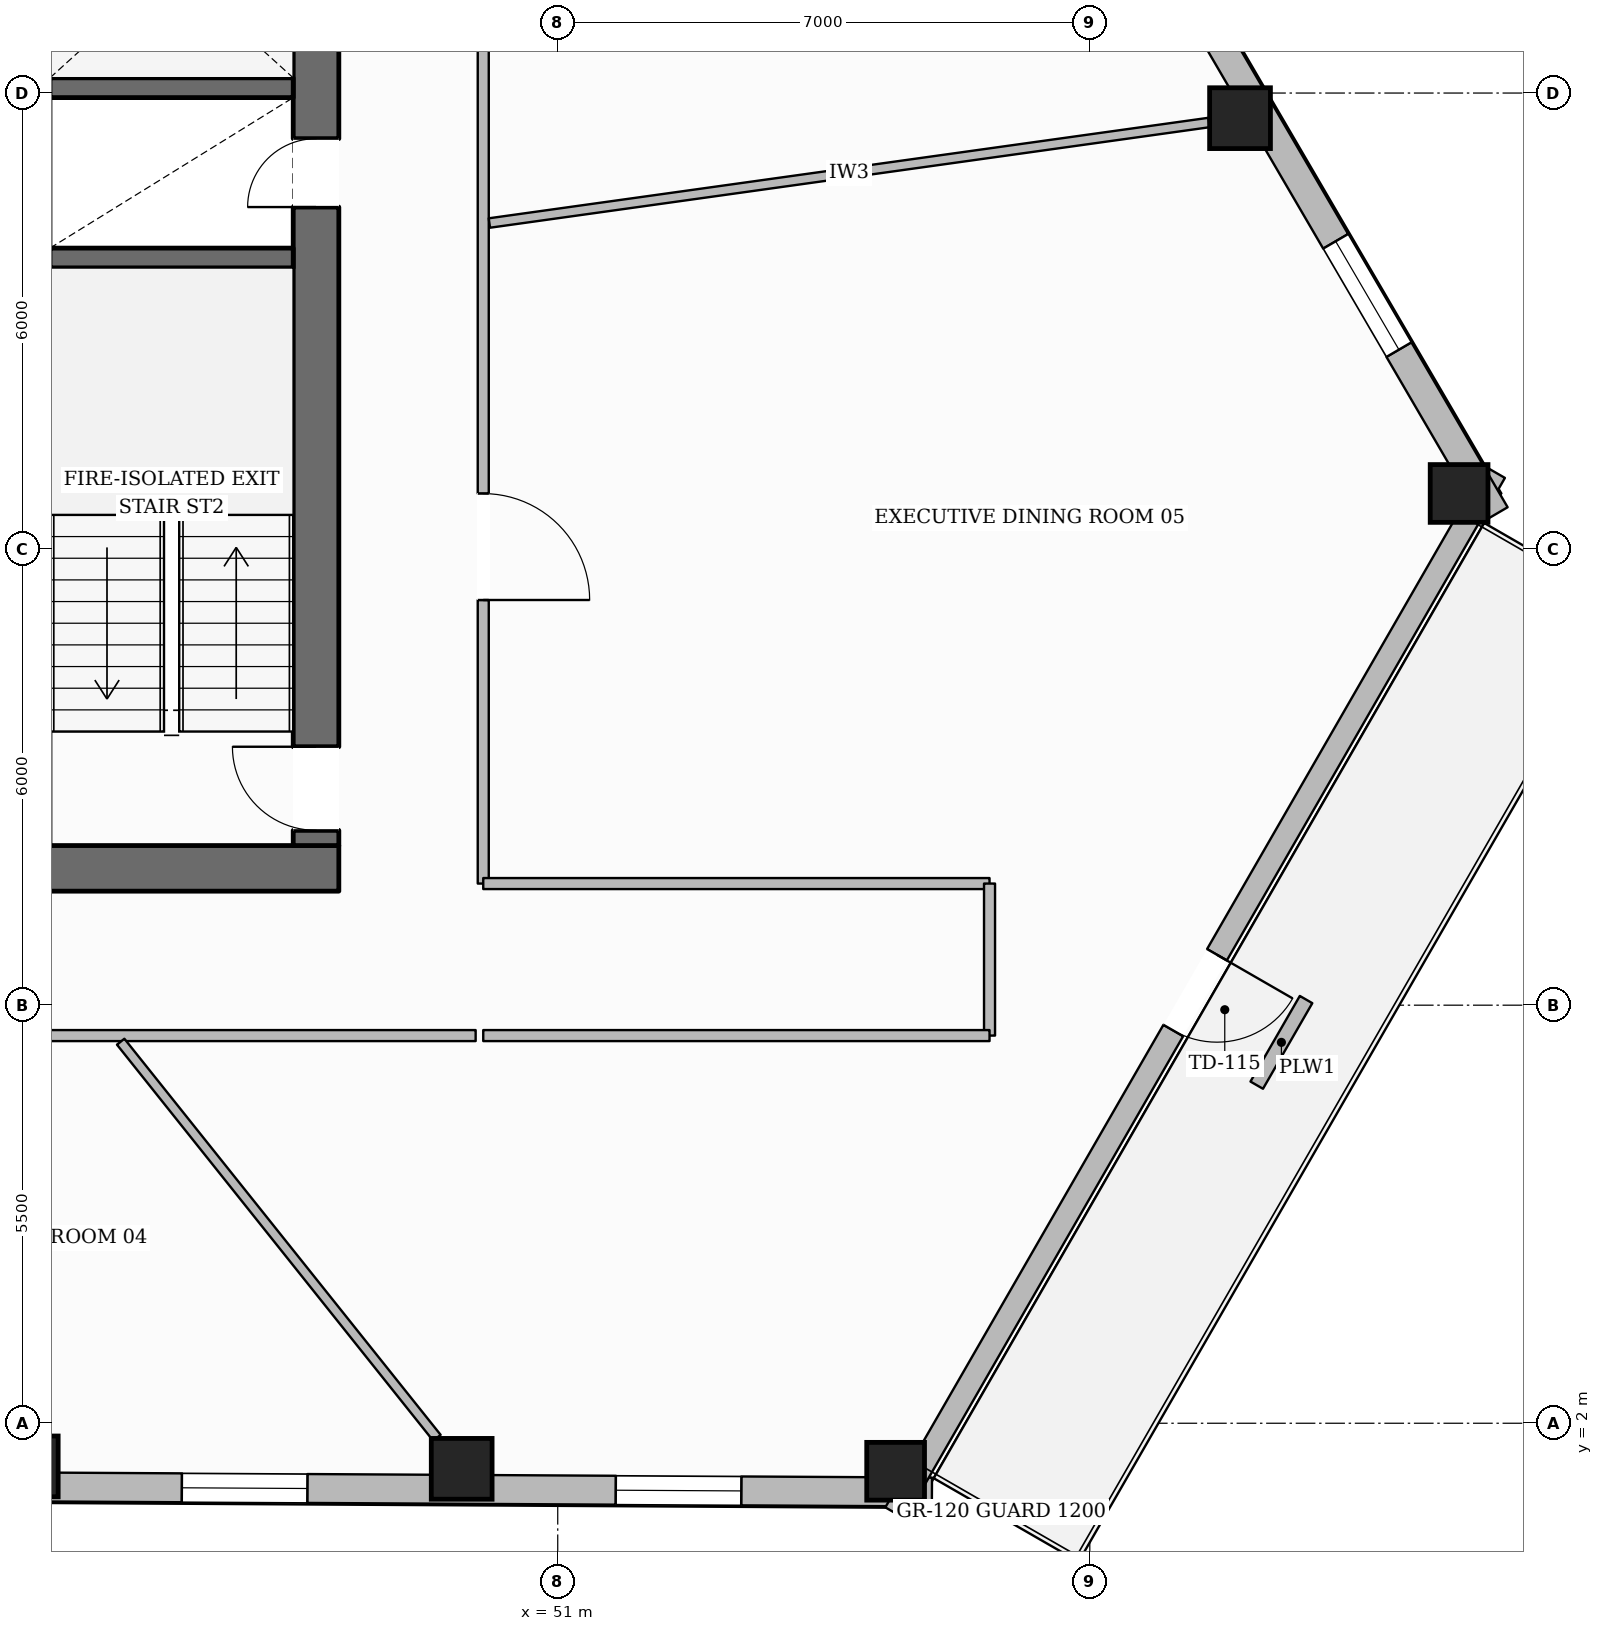
"""IFC4 building model, lengths in metres.
Left out: names, types, materials, properties, quantities, classifications, styles, units other than length and angle.
Written with IfcOpenShell. Run it as: python <this file> out.ifc"""

import sys

from ifc_helpers import new_model, si_unit, direction, frame, frame_2d, origin, origin_2d, place, context, subcontext, project, spatial, rectangle, hollow_rectangle, extrude, element, fill, save


model = new_model("IFC4")
c1 = context("Model", 3, precision=1e-05, world=origin(), true_north=direction((0.0, 1.0)))
c2 = subcontext(c1, "Body", "Model", "MODEL_VIEW")
j1 = project(units=[si_unit("LENGTHUNIT", "METRE"), si_unit("PLANEANGLEUNIT", "RADIAN")], contexts=[c1])
p1 = place(None, origin())
s1 = spatial("IfcSite", under=j1, at=p1, CompositionType="ELEMENT")
p2 = place(p1, origin())
s2 = spatial("IfcBuilding", under=s1, at=p2, CompositionType="ELEMENT")
p3 = place(p2, frame((0.0, 0.0, 48.35)))
s3 = spatial("IfcBuildingStorey", under=s2, at=p3, CompositionType="ELEMENT", Elevation=48.35)
p4 = place(p3, frame((27.88, 9.3, 0.0), z_axis=(0.0, 0.0, 1.0), x_axis=(1.0, 0.0, 0.0)))
e1 = element("IfcWall", 1, at=p4, inside=s3, PredefinedType="SOLIDWALL", context=c2, shape_type="SweptSolid", body=[
    extrude(rectangle(XDim=20.24, YDim=0.6, at=frame_2d((10.12, 0.0))), origin(), (0.0, 0.0, 1.0), 3.59),
])
p5 = place(p4, frame((10.62, 0.0, 0.0)))
e2 = element("IfcOpeningElement", 2, at=p5, cuts=e1, PredefinedType="OPENING", context=c2, shape_type="SweptSolid", body=[
    extrude(rectangle(XDim=1.4, YDim=2.2, at=frame_2d((0.7, 1.1))), frame((0.0, 0.31, 0.0), z_axis=(0.0, -1.0, 0.0), x_axis=(1.0, 0.0, 0.0)), (0.0, 0.0, 1.0), 0.62),
])
p6 = place(p3, frame((47.82, 9.6, 0.0), z_axis=(0.0, 0.0, 1.0), x_axis=(0.0, 1.0, 0.0)))
e3 = element("IfcWall", 3, at=p6, inside=s3, PredefinedType="SOLIDWALL", context=c2, shape_type="SweptSolid", body=[
    extrude(rectangle(XDim=13.0, YDim=0.6, at=frame_2d((6.5, 0.0))), origin(), (0.0, 0.0, 1.0), 3.59),
])
p7 = place(p6, frame((0.2, 0.0, 0.0)))
e4 = element("IfcOpeningElement", 4, at=p7, cuts=e3, PredefinedType="OPENING", context=c2, shape_type="SweptSolid", body=[
    extrude(rectangle(XDim=1.1, YDim=2.15, at=frame_2d((0.55, 1.075))), frame((0.0, 0.31, 0.0), z_axis=(0.0, -1.0, 0.0), x_axis=(1.0, 0.0, 0.0)), (0.0, 0.0, 1.0), 0.62),
])
p8 = place(p6, frame((8.4, 0.0, 0.0)))
e5 = element("IfcOpeningElement", 5, at=p8, cuts=e3, PredefinedType="OPENING", context=c2, shape_type="SweptSolid", body=[
    extrude(rectangle(XDim=0.9, YDim=2.1, at=frame_2d((0.45, 1.05))), frame((0.0, 0.31, 0.0), z_axis=(0.0, -1.0, 0.0), x_axis=(1.0, 0.0, 0.0)), (0.0, 0.0, 1.0), 0.62),
])
for number, where, z_axis, x_axis in (
    (6, (44.32, 17.33, 0.0), (0.0, 0.0, 1.0), (1.0, 0.0, 0.0)),
    (7, (44.32, 19.57, 0.0), (0.0, 0.0, 1.0), (1.0, 0.0, 0.0)),
):
    element("IfcWall", number, at=place(p3, frame(where, z_axis=z_axis, x_axis=x_axis)), inside=s3, PredefinedType="SHEAR", context=c2, shape_type="SweptSolid", body=[
        extrude(rectangle(XDim=3.2, YDim=0.26, at=frame_2d((1.6, 0.0))), origin(), (0.0, 0.0, 1.0), 3.59),
    ])
for number, where, z_axis, x_axis in (
    (8, (44.027, 1.432, 0.0), (0.0, 0.0, 1.0), (1.0, 0.0, 0.0)),
    (9, (49.736, 1.4, 0.0), (0.0, 0.0, 1.0), (1.0, 0.0, 0.0)),
):
    element("IfcColumn", number, at=place(p3, frame(where, z_axis=z_axis, x_axis=x_axis)), inside=s3, PredefinedType="COLUMN", context=c2, shape_type="SweptSolid", body=[
        extrude(hollow_rectangle(XDim=0.8, YDim=0.8, WallThickness=0.036, at=origin_2d()), origin(), (0.0, 0.0, 1.0), 3.59),
    ])
for number, where, z_axis, x_axis in (
    (10, (55.445, 1.368, 0.0), (0.0, 0.0, 1.0), (1.0, 0.0, 0.0)),
    (11, (62.858, 14.232, 0.0), (0.0, 0.0, 1.0), (1.0, 0.0, 0.0)),
):
    element("IfcColumn", number, at=place(p3, frame(where, z_axis=z_axis, x_axis=x_axis)), inside=s3, PredefinedType="COLUMN", context=c2, shape_type="SweptSolid", body=[
        extrude(hollow_rectangle(XDim=0.76, YDim=0.76, WallThickness=0.035, at=origin_2d()), origin(), (0.0, 0.0, 1.0), 3.59),
    ])
p9 = place(p3, frame((59.976, 19.169, 0.0), z_axis=(0.0, 0.0, 1.0), x_axis=(1.0, 0.0, 0.0)))
e12 = element("IfcColumn", 12, at=p9, inside=s3, PredefinedType="COLUMN", context=c2, shape_type="SweptSolid", body=[
    extrude(hollow_rectangle(XDim=0.8, YDim=0.8, WallThickness=0.036, at=origin_2d()), origin(), (0.0, 0.0, 1.0), 3.59),
])
p10 = place(p3, frame((55.923, 1.096, 0.0), z_axis=(0.0, 0.0, 1.0), x_axis=(-0.999984419156, 0.005582243732, 0.0)))
e13 = element("IfcWall", 13, at=p10, inside=s3, PredefinedType="STANDARD", context=c2, shape_type="SweptSolid", body=[
    extrude(rectangle(XDim=35.207, YDim=0.38, at=frame_2d((17.604, 0.0))), origin(), (0.0, 0.0, 1.0), 2.97),
])
p11 = place(p10, frame((25.805, 0.0, 0.0)))
e14 = element("IfcOpeningElement", 14, at=p11, cuts=e13, PredefinedType="OPENING", context=c2, shape_type="SweptSolid", body=[
    extrude(rectangle(XDim=1.0, YDim=2.2, at=frame_2d((0.5, 1.1))), frame((0.0, 0.2, 0.0), z_axis=(0.0, -1.0, 0.0), x_axis=(1.0, 0.0, 0.0)), (0.0, 0.0, 1.0), 0.4),
])
p12 = place(p10, frame((31.054, 0.0, 0.65)))
e15 = element("IfcOpeningElement", 15, at=p12, cuts=e13, PredefinedType="OPENING", context=c2, shape_type="SweptSolid", body=[
    extrude(rectangle(XDim=1.65, YDim=1.75, at=frame_2d((0.825, 0.875))), frame((0.0, 0.2, 0.0), z_axis=(0.0, -1.0, 0.0), x_axis=(1.0, 0.0, 0.0)), (0.0, 0.0, 1.0), 0.4),
])
p13 = place(p10, frame((19.636, 0.0, 0.65)))
e16 = element("IfcOpeningElement", 16, at=p13, cuts=e13, PredefinedType="OPENING", context=c2, shape_type="SweptSolid", body=[
    extrude(rectangle(XDim=1.65, YDim=1.75, at=frame_2d((0.825, 0.875))), frame((0.0, 0.2, 0.0), z_axis=(0.0, -1.0, 0.0), x_axis=(1.0, 0.0, 0.0)), (0.0, 0.0, 1.0), 0.4),
])
p14 = place(p10, frame((8.218, 0.0, 0.65)))
e17 = element("IfcOpeningElement", 17, at=p14, cuts=e13, PredefinedType="OPENING", context=c2, shape_type="SweptSolid", body=[
    extrude(rectangle(XDim=1.65, YDim=1.75, at=frame_2d((0.825, 0.875))), frame((0.0, 0.2, 0.0), z_axis=(0.0, -1.0, 0.0), x_axis=(1.0, 0.0, 0.0)), (0.0, 0.0, 1.0), 0.4),
])
p15 = place(p10, frame((2.509, 0.0, 0.65)))
e18 = element("IfcOpeningElement", 18, at=p15, cuts=e13, PredefinedType="OPENING", context=c2, shape_type="SweptSolid", body=[
    extrude(rectangle(XDim=1.65, YDim=1.75, at=frame_2d((0.825, 0.875))), frame((0.0, 0.2, 0.0), z_axis=(0.0, -1.0, 0.0), x_axis=(1.0, 0.0, 0.0)), (0.0, 0.0, 1.0), 0.4),
])
p16 = place(p3, frame((63.331, 14.512, 0.0), z_axis=(0.0, 0.0, 1.0), x_axis=(-0.499311399625, -0.866422602547, 0.0)))
e19 = element("IfcWall", 19, at=p16, inside=s3, PredefinedType="STANDARD", context=c2, shape_type="SweptSolid", body=[
    extrude(rectangle(XDim=15.804, YDim=0.3, at=frame_2d((7.902, 0.0))), origin(), (0.0, 0.0, 1.0), 2.97),
])
p17 = place(p16, frame((7.327, 0.0, 0.0)))
e20 = element("IfcOpeningElement", 20, at=p17, cuts=e19, PredefinedType="OPENING", context=c2, shape_type="SweptSolid", body=[
    extrude(rectangle(XDim=1.15, YDim=2.2, at=frame_2d((0.575, 1.1))), frame((0.0, 0.16, 0.0), z_axis=(0.0, -1.0, 0.0), x_axis=(1.0, 0.0, 0.0)), (0.0, 0.0, 1.0), 0.32),
])
p18 = place(p3, frame((45.56, 44.402, 0.0), z_axis=(0.0, 0.0, 1.0), x_axis=(0.504140111044, -0.86362187816, 0.0)))
e21 = element("IfcWall", 21, at=p18, inside=s3, PredefinedType="STANDARD", context=c2, shape_type="SweptSolid", body=[
    extrude(rectangle(XDim=35.254, YDim=0.38, at=frame_2d((17.627, 0.0))), origin(), (0.0, 0.0, 1.0), 2.97),
])
p19 = place(p18, frame((31.093, 0.0, 0.65)))
e22 = element("IfcOpeningElement", 22, at=p19, cuts=e21, PredefinedType="OPENING", context=c2, shape_type="SweptSolid", body=[
    extrude(rectangle(XDim=1.65, YDim=1.75, at=frame_2d((0.825, 0.875))), frame((0.0, 0.2, 0.0), z_axis=(0.0, -1.0, 0.0), x_axis=(1.0, 0.0, 0.0)), (0.0, 0.0, 1.0), 0.4),
])
p20 = place(p18, frame((25.375, 0.0, 0.65)))
e23 = element("IfcOpeningElement", 23, at=p20, cuts=e21, PredefinedType="OPENING", context=c2, shape_type="SweptSolid", body=[
    extrude(rectangle(XDim=1.65, YDim=1.75, at=frame_2d((0.825, 0.875))), frame((0.0, 0.2, 0.0), z_axis=(0.0, -1.0, 0.0), x_axis=(1.0, 0.0, 0.0)), (0.0, 0.0, 1.0), 0.4),
])
p21 = place(p18, frame((19.658, 0.0, 0.65)))
e24 = element("IfcOpeningElement", 24, at=p21, cuts=e21, PredefinedType="OPENING", context=c2, shape_type="SweptSolid", body=[
    extrude(rectangle(XDim=1.65, YDim=1.75, at=frame_2d((0.825, 0.875))), frame((0.0, 0.2, 0.0), z_axis=(0.0, -1.0, 0.0), x_axis=(1.0, 0.0, 0.0)), (0.0, 0.0, 1.0), 0.4),
])
p22 = place(p18, frame((8.224, 0.0, 0.65)))
e25 = element("IfcOpeningElement", 25, at=p22, cuts=e21, PredefinedType="OPENING", context=c2, shape_type="SweptSolid", body=[
    extrude(rectangle(XDim=1.65, YDim=1.75, at=frame_2d((0.825, 0.875))), frame((0.0, 0.2, 0.0), z_axis=(0.0, -1.0, 0.0), x_axis=(1.0, 0.0, 0.0)), (0.0, 0.0, 1.0), 0.4),
])
p23 = place(p18, frame((2.507, 0.0, 0.65)))
e26 = element("IfcOpeningElement", 26, at=p23, cuts=e21, PredefinedType="OPENING", context=c2, shape_type="SweptSolid", body=[
    extrude(rectangle(XDim=1.65, YDim=1.75, at=frame_2d((0.825, 0.875))), frame((0.0, 0.2, 0.0), z_axis=(0.0, -1.0, 0.0), x_axis=(1.0, 0.0, 0.0)), (0.0, 0.0, 1.0), 0.4),
])
p24 = place(p3, frame((60.196, 6.448, 0.0), z_axis=(0.0, 0.0, 1.0), x_axis=(0.49931057024, 0.866423080514, 0.0)))
e27 = element("IfcWall", 27, at=p24, inside=s3, PredefinedType="USERDEFINED", context=c2, shape_type="SweptSolid", body=[
    extrude(rectangle(XDim=1.3, YDim=0.19, at=frame_2d((0.65, 0.0))), origin(), (0.0, 0.0, 1.0), 0.52),
])
p25 = place(p3, frame((50.02, 25.1, 0.0), z_axis=(0.0, 0.0, 1.0), x_axis=(0.0, -1.0, 0.0)))
e28 = element("IfcWall", 28, at=p25, inside=s3, PredefinedType="PARTITIONING", context=c2, shape_type="SweptSolid", body=[
    extrude(rectangle(XDim=16.0, YDim=0.145, at=frame_2d((8.0, 0.0))), origin(), (0.0, 0.0, 1.0), 3.278),
])
p26 = place(p25, frame((3.04, 0.0, 0.0)))
e29 = element("IfcOpeningElement", 29, at=p26, cuts=e28, PredefinedType="OPENING", context=c2, shape_type="SweptSolid", body=[
    extrude(rectangle(XDim=1.4, YDim=2.2, at=frame_2d((0.7, 1.1))), frame((0.0, 0.083, 0.0), z_axis=(0.0, -1.0, 0.0), x_axis=(1.0, 0.0, 0.0)), (0.0, 0.0, 1.0), 0.165),
])
p27 = place(p25, frame((10.869, 0.0, 0.0)))
e30 = element("IfcOpeningElement", 30, at=p27, cuts=e28, PredefinedType="OPENING", context=c2, shape_type="SweptSolid", body=[
    extrude(rectangle(XDim=1.4, YDim=2.2, at=frame_2d((0.7, 1.1))), frame((0.0, 0.083, 0.0), z_axis=(0.0, -1.0, 0.0), x_axis=(1.0, 0.0, 0.0)), (0.0, 0.0, 1.0), 0.165),
])
p28 = place(p3, frame((50.02, 9.1, 0.0), z_axis=(0.0, 0.0, 1.0), x_axis=(1.0, 0.0, 0.0)))
e31 = element("IfcWall", 31, at=p28, inside=s3, PredefinedType="PARTITIONING", context=c2, shape_type="SweptSolid", body=[
    extrude(rectangle(XDim=6.661, YDim=0.145, at=frame_2d((3.331, 0.0))), origin(), (0.0, 0.0, 1.0), 3.59),
])
p29 = place(p3, frame((56.681, 9.1, 0.0), z_axis=(0.0, 0.0, 1.0), x_axis=(0.0, -1.0, 0.0)))
e32 = element("IfcWall", 32, at=p29, inside=s3, PredefinedType="PARTITIONING", context=c2, shape_type="SweptSolid", body=[
    extrude(rectangle(XDim=2.0, YDim=0.145, at=frame_2d((1.0, 0.0))), origin(), (0.0, 0.0, 1.0), 3.59),
])
p30 = place(p3, frame((56.681, 7.1, 0.0), z_axis=(0.0, 0.0, 1.0), x_axis=(-1.0, 0.0, 0.0)))
e33 = element("IfcWall", 33, at=p30, inside=s3, PredefinedType="PARTITIONING", context=c2, shape_type="SweptSolid", body=[
    extrude(rectangle(XDim=6.661, YDim=0.145, at=frame_2d((3.331, 0.0))), origin(), (0.0, 0.0, 1.0), 3.59),
])
p31 = place(p3, frame((49.92, 7.1, 0.0), z_axis=(0.0, 0.0, 1.0), x_axis=(-1.0, 0.0, 0.0)))
e34 = element("IfcWall", 34, at=p31, inside=s3, PredefinedType="PARTITIONING", context=c2, shape_type="SweptSolid", body=[
    extrude(rectangle(XDim=23.84, YDim=0.145, at=frame_2d((11.92, 0.0))), origin(), (0.0, 0.0, 1.0), 3.278),
])
p32 = place(p31, frame((18.48, 0.0, 0.0)))
e35 = element("IfcOpeningElement", 35, at=p32, cuts=e34, PredefinedType="OPENING", context=c2, shape_type="SweptSolid", body=[
    extrude(rectangle(XDim=0.88, YDim=2.1, at=frame_2d((0.44, 1.05))), frame((0.0, 0.083, 0.0), z_axis=(0.0, -1.0, 0.0), x_axis=(1.0, 0.0, 0.0)), (0.0, 0.0, 1.0), 0.165),
])
p33 = place(p31, frame((15.96, 0.0, 0.0)))
e36 = element("IfcOpeningElement", 36, at=p33, cuts=e34, PredefinedType="OPENING", context=c2, shape_type="SweptSolid", body=[
    extrude(rectangle(XDim=0.88, YDim=2.1, at=frame_2d((0.44, 1.05))), frame((0.0, 0.083, 0.0), z_axis=(0.0, -1.0, 0.0), x_axis=(1.0, 0.0, 0.0)), (0.0, 0.0, 1.0), 0.165),
])
p34 = place(p31, frame((13.5, 0.0, 0.0)))
e37 = element("IfcOpeningElement", 37, at=p34, cuts=e34, PredefinedType="OPENING", context=c2, shape_type="SweptSolid", body=[
    extrude(rectangle(XDim=0.96, YDim=2.1, at=frame_2d((0.48, 1.05))), frame((0.0, 0.083, 0.0), z_axis=(0.0, -1.0, 0.0), x_axis=(1.0, 0.0, 0.0)), (0.0, 0.0, 1.0), 0.165),
])
p35 = place(p31, frame((8.085, 0.0, 0.0)))
e38 = element("IfcOpeningElement", 38, at=p35, cuts=e34, PredefinedType="OPENING", context=c2, shape_type="SweptSolid", body=[
    extrude(rectangle(XDim=1.4, YDim=2.2, at=frame_2d((0.7, 1.1))), frame((0.0, 0.083, 0.0), z_axis=(0.0, -1.0, 0.0), x_axis=(1.0, 0.0, 0.0)), (0.0, 0.0, 1.0), 0.165),
])
p36 = place(p3, frame((50.101, 17.79, 0.0), z_axis=(0.0, 0.0, 1.0), x_axis=(0.99038797962, 0.138317207262, 0.0)))
e39 = element("IfcWall", 39, at=p36, inside=s3, PredefinedType="PARTITIONING", context=c2, shape_type="SweptSolid", body=[
    extrude(rectangle(XDim=9.56, YDim=0.125, at=frame_2d((4.78, 0.0))), origin(), (0.0, 0.0, 1.0), 3.057),
])
p37 = place(p3, frame((45.25, 7.02, 0.0), z_axis=(0.0, 0.0, 1.0), x_axis=(0.623935730438, -0.781475658151, 0.0)))
e40 = element("IfcWall", 40, at=p37, inside=s3, PredefinedType="PARTITIONING", context=c2, shape_type="SweptSolid", body=[
    extrude(rectangle(XDim=6.668, YDim=0.125, at=frame_2d((3.334, 0.0))), origin(), (0.0, 0.0, 1.0), 3.59),
])
p38 = place(p17, origin())
e41 = element("IfcDoor", 41, at=p38, inside=s3, OperationType="SINGLE_SWING_LEFT", PredefinedType="DOOR", context=c2, shape_type="SweptSolid", body=[
    extrude(rectangle(XDim=1.15, YDim=2.2, at=frame_2d((0.575, 1.1))), frame((0.0, 0.025, 0.0), z_axis=(0.0, -1.0, 0.0), x_axis=(1.0, 0.0, 0.0)), (0.0, 0.0, 1.0), 0.05),
])
fill(e20, e41)
p39 = place(p14, origin())
e42 = element("IfcWindow", 42, at=p39, inside=s3, PartitioningType="SINGLE_PANEL", PredefinedType="WINDOW", context=c2, shape_type="SweptSolid", body=[
    extrude(rectangle(XDim=1.65, YDim=1.75, at=frame_2d((0.825, 0.875))), frame((0.0, 0.03, 0.0), z_axis=(0.0, -1.0, 0.0), x_axis=(1.0, 0.0, 0.0)), (0.0, 0.0, 1.0), 0.06),
])
fill(e17, e42)
p40 = place(p15, origin())
e43 = element("IfcWindow", 43, at=p40, inside=s3, PartitioningType="SINGLE_PANEL", PredefinedType="WINDOW", context=c2, shape_type="SweptSolid", body=[
    extrude(rectangle(XDim=1.65, YDim=1.75, at=frame_2d((0.825, 0.875))), frame((0.0, 0.03, 0.0), z_axis=(0.0, -1.0, 0.0), x_axis=(1.0, 0.0, 0.0)), (0.0, 0.0, 1.0), 0.06),
])
fill(e18, e43)
p41 = place(p19, origin())
e44 = element("IfcWindow", 44, at=p41, inside=s3, PartitioningType="SINGLE_PANEL", PredefinedType="WINDOW", context=c2, shape_type="SweptSolid", body=[
    extrude(rectangle(XDim=1.65, YDim=1.75, at=frame_2d((0.825, 0.875))), frame((0.0, 0.03, 0.0), z_axis=(0.0, -1.0, 0.0), x_axis=(1.0, 0.0, 0.0)), (0.0, 0.0, 1.0), 0.06),
])
fill(e22, e44)
p42 = place(p7, origin())
e45 = element("IfcDoor", 45, at=p42, inside=s3, OperationType="SINGLE_SWING_RIGHT", PredefinedType="DOOR", context=c2, shape_type="SweptSolid", body=[
    extrude(rectangle(XDim=1.1, YDim=2.15, at=frame_2d((0.55, 1.075))), frame((0.0, 0.025, 0.0), z_axis=(0.0, -1.0, 0.0), x_axis=(1.0, 0.0, 0.0)), (0.0, 0.0, 1.0), 0.05),
])
fill(e4, e45)
p43 = place(p8, origin())
e46 = element("IfcDoor", 46, at=p43, inside=s3, OperationType="SINGLE_SWING_LEFT", PredefinedType="DOOR", context=c2, shape_type="SweptSolid", body=[
    extrude(rectangle(XDim=0.9, YDim=2.1, at=frame_2d((0.45, 1.05))), frame((0.0, 0.025, 0.0), z_axis=(0.0, -1.0, 0.0), x_axis=(1.0, 0.0, 0.0)), (0.0, 0.0, 1.0), 0.05),
])
fill(e5, e46)
p44 = place(p27, origin())
e47 = element("IfcDoor", 47, at=p44, inside=s3, OperationType="SINGLE_SWING_RIGHT", PredefinedType="DOOR", context=c2, shape_type="SweptSolid", body=[
    extrude(rectangle(XDim=1.4, YDim=2.2, at=frame_2d((0.7, 1.1))), frame((0.0, 0.025, 0.0), z_axis=(0.0, -1.0, 0.0), x_axis=(1.0, 0.0, 0.0)), (0.0, 0.0, 1.0), 0.05),
])
fill(e30, e47)
save(model, sys.argv[1])
